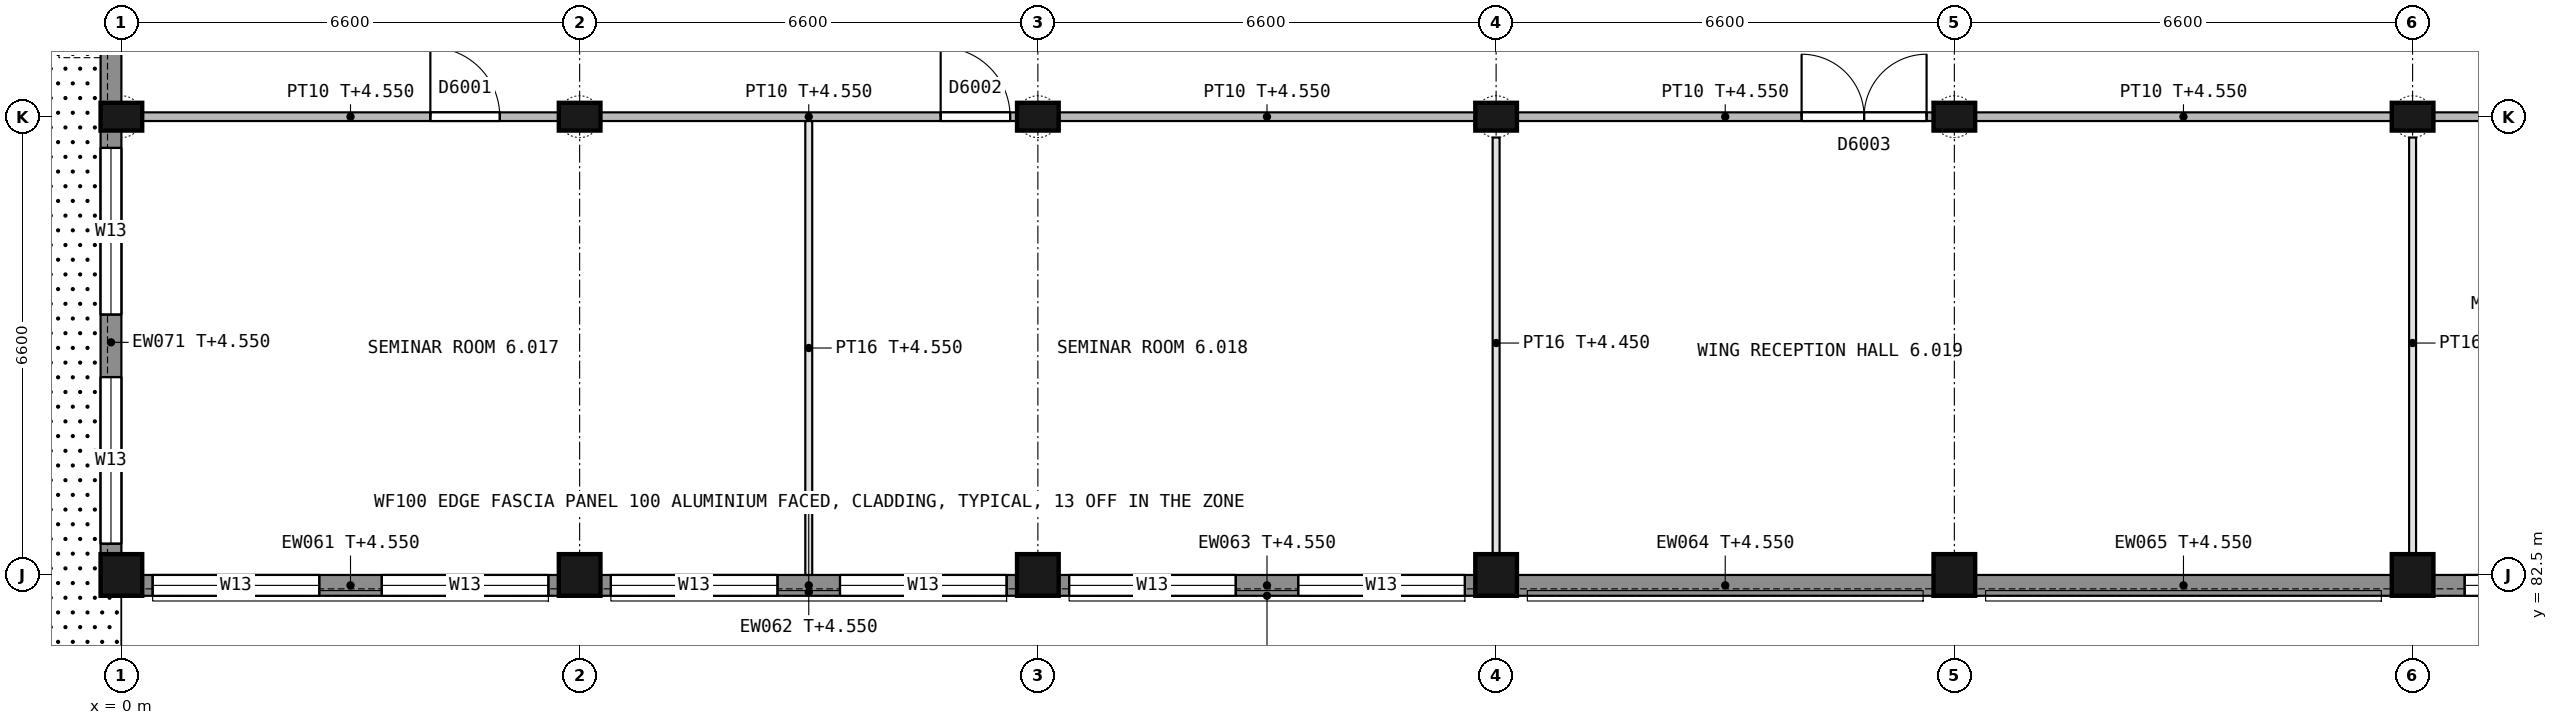
"""IFC4 building model, lengths in metres.
Left out: names, types, materials, properties, quantities, classifications, styles, units other than length and angle.
Written with IfcOpenShell. Run it as: python <this file> out.ifc"""

import sys

from ifc_helpers import new_model, si_unit, direction, frame, frame_2d, origin, origin_2d, place, context, subcontext, project, spatial, rectangle, extrude, element, fill, save


model = new_model("IFC4")
c1 = context("Model", 3, precision=1e-05, world=origin(), true_north=direction((0.0, 1.0)))
c2 = subcontext(c1, "Body", "Model", "MODEL_VIEW")
j1 = project(units=[si_unit("LENGTHUNIT", "METRE"), si_unit("PLANEANGLEUNIT", "RADIAN")], contexts=[c1])
p1 = place(None, origin())
s1 = spatial("IfcSite", under=j1, at=p1, CompositionType="ELEMENT")
p2 = place(p1, origin())
s2 = spatial("IfcBuilding", under=s1, at=p2, CompositionType="ELEMENT")
p3 = place(p2, origin())
s3 = spatial("IfcBuildingStorey", under=s2, at=p3, CompositionType="ELEMENT", Elevation=0.0)
p4 = place(p3, frame((0.0, 82.5, 0.0), z_axis=(0.0, 0.0, 1.0), x_axis=(1.0, 0.0, 0.0)))
e1 = element("IfcColumn", 1, at=p4, inside=s3, PredefinedType="COLUMN", context=c2, shape_type="SweptSolid", body=[
    extrude(rectangle(XDim=0.6, YDim=0.6, at=origin_2d()), origin(), (0.0, 0.0, 1.0), 5.4),
])
p5 = place(p3, frame((0.0, 89.1, 0.0), z_axis=(0.0, 0.0, 1.0), x_axis=(1.0, 0.0, 0.0)))
e2 = element("IfcColumn", 2, at=p5, inside=s3, PredefinedType="COLUMN", context=c2, shape_type="SweptSolid", body=[
    extrude(rectangle(XDim=0.6, YDim=0.4, at=origin_2d()), origin(), (0.0, 0.0, 1.0), 5.4),
])
p6 = place(p3, frame((6.6, 82.5, 0.0), z_axis=(0.0, 0.0, 1.0), x_axis=(1.0, 0.0, 0.0)))
e3 = element("IfcColumn", 3, at=p6, inside=s3, PredefinedType="COLUMN", context=c2, shape_type="SweptSolid", body=[
    extrude(rectangle(XDim=0.6, YDim=0.6, at=origin_2d()), origin(), (0.0, 0.0, 1.0), 5.4),
])
p7 = place(p3, frame((6.6, 89.1, 0.0), z_axis=(0.0, 0.0, 1.0), x_axis=(1.0, 0.0, 0.0)))
e4 = element("IfcColumn", 4, at=p7, inside=s3, PredefinedType="COLUMN", context=c2, shape_type="SweptSolid", body=[
    extrude(rectangle(XDim=0.6, YDim=0.4, at=origin_2d()), origin(), (0.0, 0.0, 1.0), 5.4),
])
p8 = place(p3, frame((13.2, 82.5, 0.0), z_axis=(0.0, 0.0, 1.0), x_axis=(1.0, 0.0, 0.0)))
e5 = element("IfcColumn", 5, at=p8, inside=s3, PredefinedType="COLUMN", context=c2, shape_type="SweptSolid", body=[
    extrude(rectangle(XDim=0.6, YDim=0.6, at=origin_2d()), origin(), (0.0, 0.0, 1.0), 5.4),
])
p9 = place(p3, frame((13.2, 89.1, 0.0), z_axis=(0.0, 0.0, 1.0), x_axis=(1.0, 0.0, 0.0)))
e6 = element("IfcColumn", 6, at=p9, inside=s3, PredefinedType="COLUMN", context=c2, shape_type="SweptSolid", body=[
    extrude(rectangle(XDim=0.6, YDim=0.4, at=origin_2d()), origin(), (0.0, 0.0, 1.0), 5.4),
])
p10 = place(p3, frame((19.8, 82.5, 0.0), z_axis=(0.0, 0.0, 1.0), x_axis=(1.0, 0.0, 0.0)))
e7 = element("IfcColumn", 7, at=p10, inside=s3, PredefinedType="COLUMN", context=c2, shape_type="SweptSolid", body=[
    extrude(rectangle(XDim=0.6, YDim=0.6, at=origin_2d()), origin(), (0.0, 0.0, 1.0), 5.4),
])
p11 = place(p3, frame((19.8, 89.1, 0.0), z_axis=(0.0, 0.0, 1.0), x_axis=(1.0, 0.0, 0.0)))
e8 = element("IfcColumn", 8, at=p11, inside=s3, PredefinedType="COLUMN", context=c2, shape_type="SweptSolid", body=[
    extrude(rectangle(XDim=0.6, YDim=0.4, at=origin_2d()), origin(), (0.0, 0.0, 1.0), 5.4),
])
p12 = place(p3, frame((26.4, 82.5, 0.0), z_axis=(0.0, 0.0, 1.0), x_axis=(1.0, 0.0, 0.0)))
e9 = element("IfcColumn", 9, at=p12, inside=s3, PredefinedType="COLUMN", context=c2, shape_type="SweptSolid", body=[
    extrude(rectangle(XDim=0.6, YDim=0.6, at=origin_2d()), origin(), (0.0, 0.0, 1.0), 5.4),
])
p13 = place(p3, frame((26.4, 89.1, 0.0), z_axis=(0.0, 0.0, 1.0), x_axis=(1.0, 0.0, 0.0)))
e10 = element("IfcColumn", 10, at=p13, inside=s3, PredefinedType="COLUMN", context=c2, shape_type="SweptSolid", body=[
    extrude(rectangle(XDim=0.6, YDim=0.4, at=origin_2d()), origin(), (0.0, 0.0, 1.0), 5.4),
])
p14 = place(p3, frame((33.0, 82.5, 0.0), z_axis=(0.0, 0.0, 1.0), x_axis=(1.0, 0.0, 0.0)))
e11 = element("IfcColumn", 11, at=p14, inside=s3, PredefinedType="COLUMN", context=c2, shape_type="SweptSolid", body=[
    extrude(rectangle(XDim=0.6, YDim=0.6, at=origin_2d()), origin(), (0.0, 0.0, 1.0), 5.4),
])
p15 = place(p3, frame((33.0, 89.1, 0.0), z_axis=(0.0, 0.0, 1.0), x_axis=(1.0, 0.0, 0.0)))
e12 = element("IfcColumn", 12, at=p15, inside=s3, PredefinedType="COLUMN", context=c2, shape_type="SweptSolid", body=[
    extrude(rectangle(XDim=0.6, YDim=0.4, at=origin_2d()), origin(), (0.0, 0.0, 1.0), 5.4),
])
p16 = place(p3, frame((6.3, 82.35, 0.0), z_axis=(0.0, 0.0, 1.0), x_axis=(-1.0, 0.0, 0.0)))
e13 = element("IfcWall", 13, at=p16, inside=s3, PredefinedType="STANDARD", context=c2, shape_type="SweptSolid", body=[
    extrude(rectangle(XDim=6.0, YDim=0.3, at=frame_2d((3.0, 0.0))), origin(), (0.0, 0.0, 1.0), 4.55),
])
p17 = place(p16, frame((3.45, 0.0, 0.9)))
e14 = element("IfcOpeningElement", 14, at=p17, cuts=e13, PredefinedType="OPENING", context=c2, shape_type="SweptSolid", body=[
    extrude(rectangle(XDim=2.4, YDim=1.8, at=frame_2d((1.2, 0.9))), frame((0.0, 0.16, 0.0), z_axis=(0.0, -1.0, 0.0), x_axis=(1.0, 0.0, 0.0)), (0.0, 0.0, 1.0), 0.32),
])
p18 = place(p16, frame((0.15, 0.0, 0.9)))
e15 = element("IfcOpeningElement", 15, at=p18, cuts=e13, PredefinedType="OPENING", context=c2, shape_type="SweptSolid", body=[
    extrude(rectangle(XDim=2.4, YDim=1.8, at=frame_2d((1.2, 0.9))), frame((0.0, 0.16, 0.0), z_axis=(0.0, -1.0, 0.0), x_axis=(1.0, 0.0, 0.0)), (0.0, 0.0, 1.0), 0.32),
])
p19 = place(p3, frame((12.9, 82.35, 0.0), z_axis=(0.0, 0.0, 1.0), x_axis=(-1.0, 0.0, 0.0)))
e16 = element("IfcWall", 16, at=p19, inside=s3, PredefinedType="STANDARD", context=c2, shape_type="SweptSolid", body=[
    extrude(rectangle(XDim=6.0, YDim=0.3, at=frame_2d((3.0, 0.0))), origin(), (0.0, 0.0, 1.0), 4.55),
])
p20 = place(p19, frame((3.45, 0.0, 0.9)))
e17 = element("IfcOpeningElement", 17, at=p20, cuts=e16, PredefinedType="OPENING", context=c2, shape_type="SweptSolid", body=[
    extrude(rectangle(XDim=2.4, YDim=1.8, at=frame_2d((1.2, 0.9))), frame((0.0, 0.16, 0.0), z_axis=(0.0, -1.0, 0.0), x_axis=(1.0, 0.0, 0.0)), (0.0, 0.0, 1.0), 0.32),
])
p21 = place(p19, frame((0.15, 0.0, 0.9)))
e18 = element("IfcOpeningElement", 18, at=p21, cuts=e16, PredefinedType="OPENING", context=c2, shape_type="SweptSolid", body=[
    extrude(rectangle(XDim=2.4, YDim=1.8, at=frame_2d((1.2, 0.9))), frame((0.0, 0.16, 0.0), z_axis=(0.0, -1.0, 0.0), x_axis=(1.0, 0.0, 0.0)), (0.0, 0.0, 1.0), 0.32),
])
p22 = place(p3, frame((19.5, 82.35, 0.0), z_axis=(0.0, 0.0, 1.0), x_axis=(-1.0, 0.0, 0.0)))
e19 = element("IfcWall", 19, at=p22, inside=s3, PredefinedType="STANDARD", context=c2, shape_type="SweptSolid", body=[
    extrude(rectangle(XDim=6.0, YDim=0.3, at=frame_2d((3.0, 0.0))), origin(), (0.0, 0.0, 1.0), 4.55),
])
p23 = place(p22, frame((3.45, 0.0, 0.9)))
e20 = element("IfcOpeningElement", 20, at=p23, cuts=e19, PredefinedType="OPENING", context=c2, shape_type="SweptSolid", body=[
    extrude(rectangle(XDim=2.4, YDim=1.8, at=frame_2d((1.2, 0.9))), frame((0.0, 0.16, 0.0), z_axis=(0.0, -1.0, 0.0), x_axis=(1.0, 0.0, 0.0)), (0.0, 0.0, 1.0), 0.32),
])
p24 = place(p22, frame((0.15, 0.0, 0.9)))
e21 = element("IfcOpeningElement", 21, at=p24, cuts=e19, PredefinedType="OPENING", context=c2, shape_type="SweptSolid", body=[
    extrude(rectangle(XDim=2.4, YDim=1.8, at=frame_2d((1.2, 0.9))), frame((0.0, 0.16, 0.0), z_axis=(0.0, -1.0, 0.0), x_axis=(1.0, 0.0, 0.0)), (0.0, 0.0, 1.0), 0.32),
])
for number, where, z_axis, x_axis in (
    (22, (26.1, 82.35, 0.0), (0.0, 0.0, 1.0), (-1.0, 0.0, 0.0)),
    (23, (32.7, 82.35, 0.0), (0.0, 0.0, 1.0), (-1.0, 0.0, 0.0)),
):
    element("IfcWall", number, at=place(p3, frame(where, z_axis=z_axis, x_axis=x_axis)), inside=s3, PredefinedType="STANDARD", context=c2, shape_type="SweptSolid", body=[
        extrude(rectangle(XDim=6.0, YDim=0.3, at=frame_2d((3.0, 0.0))), origin(), (0.0, 0.0, 1.0), 4.55),
    ])
p25 = place(p3, frame((39.6, 82.35, 0.0), z_axis=(0.0, 0.0, 1.0), x_axis=(-1.0, 0.0, 0.0)))
e24 = element("IfcWall", 24, at=p25, inside=s3, PredefinedType="STANDARD", context=c2, shape_type="SweptSolid", body=[
    extrude(rectangle(XDim=6.3, YDim=0.3, at=frame_2d((3.15, 0.0))), origin(), (0.0, 0.0, 1.0), 4.55),
])
p26 = place(p25, frame((4.05, 0.0, 0.9)))
e25 = element("IfcOpeningElement", 25, at=p26, cuts=e24, PredefinedType="OPENING", context=c2, shape_type="SweptSolid", body=[
    extrude(rectangle(XDim=1.8, YDim=1.5, at=frame_2d((0.9, 0.75))), frame((0.0, 0.16, 0.0), z_axis=(0.0, -1.0, 0.0), x_axis=(1.0, 0.0, 0.0)), (0.0, 0.0, 1.0), 0.32),
])
p27 = place(p25, frame((0.75, 0.0, 0.9)))
e26 = element("IfcOpeningElement", 26, at=p27, cuts=e24, PredefinedType="OPENING", context=c2, shape_type="SweptSolid", body=[
    extrude(rectangle(XDim=1.8, YDim=1.5, at=frame_2d((0.9, 0.75))), frame((0.0, 0.16, 0.0), z_axis=(0.0, -1.0, 0.0), x_axis=(1.0, 0.0, 0.0)), (0.0, 0.0, 1.0), 0.32),
])
p28 = place(p3, frame((-0.15, 82.8, 0.0), z_axis=(0.0, 0.0, 1.0), x_axis=(0.0, 1.0, 0.0)))
e27 = element("IfcWall", 27, at=p28, inside=s3, PredefinedType="STANDARD", context=c2, shape_type="SweptSolid", body=[
    extrude(rectangle(XDim=6.1, YDim=0.3, at=frame_2d((3.05, 0.0))), origin(), (0.0, 0.0, 1.0), 4.55),
])
p29 = place(p28, frame((0.15, 0.0, 0.9)))
e28 = element("IfcOpeningElement", 28, at=p29, cuts=e27, PredefinedType="OPENING", context=c2, shape_type="SweptSolid", body=[
    extrude(rectangle(XDim=2.4, YDim=1.8, at=frame_2d((1.2, 0.9))), frame((0.0, 0.16, 0.0), z_axis=(0.0, -1.0, 0.0), x_axis=(1.0, 0.0, 0.0)), (0.0, 0.0, 1.0), 0.32),
])
p30 = place(p28, frame((3.45, 0.0, 0.9)))
e29 = element("IfcOpeningElement", 29, at=p30, cuts=e27, PredefinedType="OPENING", context=c2, shape_type="SweptSolid", body=[
    extrude(rectangle(XDim=2.4, YDim=1.8, at=frame_2d((1.2, 0.9))), frame((0.0, 0.16, 0.0), z_axis=(0.0, -1.0, 0.0), x_axis=(1.0, 0.0, 0.0)), (0.0, 0.0, 1.0), 0.32),
])
p31 = place(p3, frame((-0.15, 89.3, 0.0), z_axis=(0.0, 0.0, 1.0), x_axis=(0.0, 1.0, 0.0)))
e30 = element("IfcWall", 30, at=p31, inside=s3, PredefinedType="STANDARD", context=c2, shape_type="SweptSolid", body=[
    extrude(rectangle(XDim=3.1, YDim=0.3, at=frame_2d((1.55, 0.0))), origin(), (0.0, 0.0, 1.0), 4.55),
])
p32 = place(p31, frame((0.85, 0.0, 1.1)))
e31 = element("IfcOpeningElement", 31, at=p32, cuts=e30, PredefinedType="OPENING", context=c2, shape_type="SweptSolid", body=[
    extrude(rectangle(XDim=1.2, YDim=1.2, at=frame_2d((0.6, 0.6))), frame((0.0, 0.16, 0.0), z_axis=(0.0, -1.0, 0.0), x_axis=(1.0, 0.0, 0.0)), (0.0, 0.0, 1.0), 0.32),
])
p33 = place(p3, frame((6.3, 89.1, 0.0), z_axis=(0.0, 0.0, 1.0), x_axis=(-1.0, 0.0, 0.0)))
e32 = element("IfcWall", 32, at=p33, inside=s3, PredefinedType="PARTITIONING", context=c2, shape_type="SweptSolid", body=[
    extrude(rectangle(XDim=6.0, YDim=0.125, at=frame_2d((3.0, 0.0))), origin(), (0.0, 0.0, 1.0), 4.55),
])
p34 = place(p33, frame((0.85, 0.0, 0.0)))
e33 = element("IfcOpeningElement", 33, at=p34, cuts=e32, PredefinedType="OPENING", context=c2, shape_type="SweptSolid", body=[
    extrude(rectangle(XDim=1.0, YDim=2.1, at=frame_2d((0.5, 1.05))), frame((0.0, 0.073, 0.0), z_axis=(0.0, -1.0, 0.0), x_axis=(1.0, 0.0, 0.0)), (0.0, 0.0, 1.0), 0.145),
])
p35 = place(p3, frame((12.9, 89.1, 0.0), z_axis=(0.0, 0.0, 1.0), x_axis=(-1.0, 0.0, 0.0)))
e34 = element("IfcWall", 34, at=p35, inside=s3, PredefinedType="PARTITIONING", context=c2, shape_type="SweptSolid", body=[
    extrude(rectangle(XDim=6.0, YDim=0.125, at=frame_2d((3.0, 0.0))), origin(), (0.0, 0.0, 1.0), 4.55),
])
p36 = place(p35, frame((0.1, 0.0, 0.0)))
e35 = element("IfcOpeningElement", 35, at=p36, cuts=e34, PredefinedType="OPENING", context=c2, shape_type="SweptSolid", body=[
    extrude(rectangle(XDim=1.0, YDim=2.1, at=frame_2d((0.5, 1.05))), frame((0.0, 0.073, 0.0), z_axis=(0.0, -1.0, 0.0), x_axis=(1.0, 0.0, 0.0)), (0.0, 0.0, 1.0), 0.145),
])
p37 = place(p3, frame((13.5, 89.1, 0.0), z_axis=(0.0, 0.0, 1.0), x_axis=(1.0, 0.0, 0.0)))
e36 = element("IfcWall", 36, at=p37, inside=s3, PredefinedType="PARTITIONING", context=c2, shape_type="SweptSolid", body=[
    extrude(rectangle(XDim=6.0, YDim=0.125, at=frame_2d((3.0, 0.0))), origin(), (0.0, 0.0, 1.0), 4.55),
])
p38 = place(p3, frame((20.1, 89.1, 0.0), z_axis=(0.0, 0.0, 1.0), x_axis=(1.0, 0.0, 0.0)))
e37 = element("IfcWall", 37, at=p38, inside=s3, PredefinedType="PARTITIONING", context=c2, shape_type="SweptSolid", body=[
    extrude(rectangle(XDim=6.0, YDim=0.125, at=frame_2d((3.0, 0.0))), origin(), (0.0, 0.0, 1.0), 4.55),
])
p39 = place(p38, frame((4.1, 0.0, 0.0)))
e38 = element("IfcOpeningElement", 38, at=p39, cuts=e37, PredefinedType="OPENING", context=c2, shape_type="SweptSolid", body=[
    extrude(rectangle(XDim=1.8, YDim=2.1, at=frame_2d((0.9, 1.05))), frame((0.0, 0.073, 0.0), z_axis=(0.0, -1.0, 0.0), x_axis=(1.0, 0.0, 0.0)), (0.0, 0.0, 1.0), 0.145),
])
p40 = place(p3, frame((26.7, 89.1, 0.0), z_axis=(0.0, 0.0, 1.0), x_axis=(1.0, 0.0, 0.0)))
e39 = element("IfcWall", 39, at=p40, inside=s3, PredefinedType="PARTITIONING", context=c2, shape_type="SweptSolid", body=[
    extrude(rectangle(XDim=6.0, YDim=0.125, at=frame_2d((3.0, 0.0))), origin(), (0.0, 0.0, 1.0), 4.55),
])
p41 = place(p3, frame((39.3, 89.1, 0.0), z_axis=(0.0, 0.0, 1.0), x_axis=(-1.0, 0.0, 0.0)))
e40 = element("IfcWall", 40, at=p41, inside=s3, PredefinedType="PARTITIONING", context=c2, shape_type="SweptSolid", body=[
    extrude(rectangle(XDim=6.0, YDim=0.125, at=frame_2d((3.0, 0.0))), origin(), (0.0, 0.0, 1.0), 4.55),
])
p42 = place(p41, frame((2.55, 0.0, 0.0)))
e41 = element("IfcOpeningElement", 41, at=p42, cuts=e40, PredefinedType="OPENING", context=c2, shape_type="SweptSolid", body=[
    extrude(rectangle(XDim=0.9, YDim=2.1, at=frame_2d((0.45, 1.05))), frame((0.0, 0.073, 0.0), z_axis=(0.0, -1.0, 0.0), x_axis=(1.0, 0.0, 0.0)), (0.0, 0.0, 1.0), 0.145),
])
p43 = place(p3, frame((9.9, 82.5, 0.0), z_axis=(0.0, 0.0, 1.0), x_axis=(0.0, 1.0, 0.0)))
e42 = element("IfcWall", 42, at=p43, inside=s3, PredefinedType="PARTITIONING", context=c2, shape_type="SweptSolid", body=[
    extrude(rectangle(XDim=6.537, YDim=0.1, at=frame_2d((3.269, 0.0))), origin(), (0.0, 0.0, 1.0), 4.55),
])
for number, where, z_axis, x_axis in (
    (43, (19.8, 82.8, 0.0), (0.0, 0.0, 1.0), (0.0, 1.0, 0.0)),
    (44, (33.0, 82.8, 0.0), (0.0, 0.0, 1.0), (0.0, 1.0, 0.0)),
):
    element("IfcWall", number, at=place(p3, frame(where, z_axis=z_axis, x_axis=x_axis)), inside=s3, PredefinedType="PARTITIONING", context=c2, shape_type="SweptSolid", body=[
        extrude(rectangle(XDim=6.0, YDim=0.1, at=frame_2d((3.0, 0.0))), origin(), (0.0, 0.0, 1.0), 4.45),
    ])
p44 = place(p17, origin())
e45 = element("IfcWindow", 45, at=p44, inside=s3, PartitioningType="SINGLE_PANEL", PredefinedType="WINDOW", context=c2, shape_type="SweptSolid", body=[
    extrude(rectangle(XDim=2.4, YDim=1.8, at=frame_2d((1.2, 0.9))), frame((0.0, 0.03, 0.0), z_axis=(0.0, -1.0, 0.0), x_axis=(1.0, 0.0, 0.0)), (0.0, 0.0, 1.0), 0.06),
])
fill(e14, e45)
p45 = place(p18, origin())
e46 = element("IfcWindow", 46, at=p45, inside=s3, PartitioningType="SINGLE_PANEL", PredefinedType="WINDOW", context=c2, shape_type="SweptSolid", body=[
    extrude(rectangle(XDim=2.4, YDim=1.8, at=frame_2d((1.2, 0.9))), frame((0.0, 0.03, 0.0), z_axis=(0.0, -1.0, 0.0), x_axis=(1.0, 0.0, 0.0)), (0.0, 0.0, 1.0), 0.06),
])
fill(e15, e46)
p46 = place(p20, origin())
e47 = element("IfcWindow", 47, at=p46, inside=s3, PartitioningType="SINGLE_PANEL", PredefinedType="WINDOW", context=c2, shape_type="SweptSolid", body=[
    extrude(rectangle(XDim=2.4, YDim=1.8, at=frame_2d((1.2, 0.9))), frame((0.0, 0.03, 0.0), z_axis=(0.0, -1.0, 0.0), x_axis=(1.0, 0.0, 0.0)), (0.0, 0.0, 1.0), 0.06),
])
fill(e17, e47)
p47 = place(p21, origin())
e48 = element("IfcWindow", 48, at=p47, inside=s3, PartitioningType="SINGLE_PANEL", PredefinedType="WINDOW", context=c2, shape_type="SweptSolid", body=[
    extrude(rectangle(XDim=2.4, YDim=1.8, at=frame_2d((1.2, 0.9))), frame((0.0, 0.03, 0.0), z_axis=(0.0, -1.0, 0.0), x_axis=(1.0, 0.0, 0.0)), (0.0, 0.0, 1.0), 0.06),
])
fill(e18, e48)
p48 = place(p23, origin())
e49 = element("IfcWindow", 49, at=p48, inside=s3, PartitioningType="SINGLE_PANEL", PredefinedType="WINDOW", context=c2, shape_type="SweptSolid", body=[
    extrude(rectangle(XDim=2.4, YDim=1.8, at=frame_2d((1.2, 0.9))), frame((0.0, 0.03, 0.0), z_axis=(0.0, -1.0, 0.0), x_axis=(1.0, 0.0, 0.0)), (0.0, 0.0, 1.0), 0.06),
])
fill(e20, e49)
p49 = place(p24, origin())
e50 = element("IfcWindow", 50, at=p49, inside=s3, PartitioningType="SINGLE_PANEL", PredefinedType="WINDOW", context=c2, shape_type="SweptSolid", body=[
    extrude(rectangle(XDim=2.4, YDim=1.8, at=frame_2d((1.2, 0.9))), frame((0.0, 0.03, 0.0), z_axis=(0.0, -1.0, 0.0), x_axis=(1.0, 0.0, 0.0)), (0.0, 0.0, 1.0), 0.06),
])
fill(e21, e50)
p50 = place(p26, origin())
e51 = element("IfcWindow", 51, at=p50, inside=s3, PartitioningType="SINGLE_PANEL", PredefinedType="WINDOW", context=c2, shape_type="SweptSolid", body=[
    extrude(rectangle(XDim=1.8, YDim=1.5, at=frame_2d((0.9, 0.75))), frame((0.0, 0.03, 0.0), z_axis=(0.0, -1.0, 0.0), x_axis=(1.0, 0.0, 0.0)), (0.0, 0.0, 1.0), 0.06),
])
fill(e25, e51)
p51 = place(p29, origin())
e52 = element("IfcWindow", 52, at=p51, inside=s3, PartitioningType="SINGLE_PANEL", PredefinedType="WINDOW", context=c2, shape_type="SweptSolid", body=[
    extrude(rectangle(XDim=2.4, YDim=1.8, at=frame_2d((1.2, 0.9))), frame((0.0, 0.03, 0.0), z_axis=(0.0, -1.0, 0.0), x_axis=(1.0, 0.0, 0.0)), (0.0, 0.0, 1.0), 0.06),
])
fill(e28, e52)
p52 = place(p30, origin())
e53 = element("IfcWindow", 53, at=p52, inside=s3, PartitioningType="SINGLE_PANEL", PredefinedType="WINDOW", context=c2, shape_type="SweptSolid", body=[
    extrude(rectangle(XDim=2.4, YDim=1.8, at=frame_2d((1.2, 0.9))), frame((0.0, 0.03, 0.0), z_axis=(0.0, -1.0, 0.0), x_axis=(1.0, 0.0, 0.0)), (0.0, 0.0, 1.0), 0.06),
])
fill(e29, e53)
p53 = place(p34, origin())
e54 = element("IfcDoor", 54, at=p53, inside=s3, OperationType="SINGLE_SWING_RIGHT", PredefinedType="DOOR", context=c2, shape_type="SweptSolid", body=[
    extrude(rectangle(XDim=1.0, YDim=2.1, at=frame_2d((0.5, 1.05))), frame((0.0, 0.025, 0.0), z_axis=(0.0, -1.0, 0.0), x_axis=(1.0, 0.0, 0.0)), (0.0, 0.0, 1.0), 0.05),
])
fill(e33, e54)
p54 = place(p36, origin())
e55 = element("IfcDoor", 55, at=p54, inside=s3, OperationType="SINGLE_SWING_RIGHT", PredefinedType="DOOR", context=c2, shape_type="SweptSolid", body=[
    extrude(rectangle(XDim=1.0, YDim=2.1, at=frame_2d((0.5, 1.05))), frame((0.0, 0.025, 0.0), z_axis=(0.0, -1.0, 0.0), x_axis=(1.0, 0.0, 0.0)), (0.0, 0.0, 1.0), 0.05),
])
fill(e35, e55)
p55 = place(p39, origin())
e56 = element("IfcDoor", 56, at=p55, inside=s3, OperationType="DOUBLE_DOOR_SINGLE_SWING", PredefinedType="DOOR", context=c2, shape_type="SweptSolid", body=[
    extrude(rectangle(XDim=1.8, YDim=2.1, at=frame_2d((0.9, 1.05))), frame((0.0, 0.025, 0.0), z_axis=(0.0, -1.0, 0.0), x_axis=(1.0, 0.0, 0.0)), (0.0, 0.0, 1.0), 0.05),
])
fill(e38, e56)
save(model, sys.argv[1])
